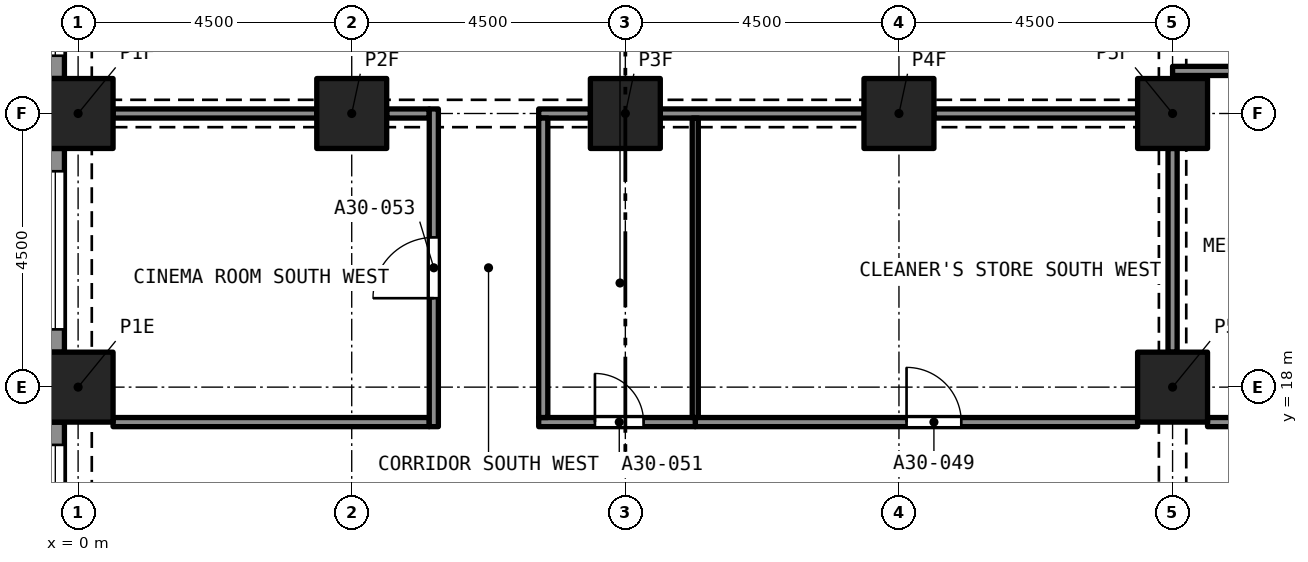
"""IFC4 building model, lengths in metres.
Left out: names, types, materials, properties, quantities, classifications, styles, units other than length and angle.
Written with IfcOpenShell. Run it as: python <this file> out.ifc"""

import sys

from ifc_helpers import new_model, si_unit, direction, frame, frame_2d, origin, origin_2d, place, context, subcontext, project, spatial, rectangle, extrude, element, fill, save


model = new_model("IFC4")
c1 = context("Model", 3, precision=1e-05, world=origin(), true_north=direction((0.0, 1.0)))
c2 = subcontext(c1, "Body", "Model", "MODEL_VIEW")
j1 = project(units=[si_unit("LENGTHUNIT", "METRE"), si_unit("PLANEANGLEUNIT", "RADIAN")], contexts=[c1])
p1 = place(None, origin())
s1 = spatial("IfcSite", under=j1, at=p1, CompositionType="ELEMENT")
p2 = place(p1, origin())
s2 = spatial("IfcBuilding", under=s1, at=p2, CompositionType="ELEMENT")
p3 = place(p2, frame((0.0, 0.0, 108.8)))
s3 = spatial("IfcBuildingStorey", under=s2, at=p3, CompositionType="ELEMENT", Elevation=108.8)
for number, where, z_axis, x_axis in (
    (1, (0.0, 18.0, 0.0), (0.0, 0.0, 1.0), (1.0, 0.0, 0.0)),
    (2, (18.0, 18.0, 0.0), (0.0, 0.0, 1.0), (1.0, 0.0, 0.0)),
    (3, (0.0, 22.5, 0.0), (0.0, 0.0, 1.0), (1.0, 0.0, 0.0)),
    (4, (4.5, 22.5, 0.0), (0.0, 0.0, 1.0), (1.0, 0.0, 0.0)),
    (5, (9.0, 22.5, 0.0), (0.0, 0.0, 1.0), (1.0, 0.0, 0.0)),
    (6, (13.5, 22.5, 0.0), (0.0, 0.0, 1.0), (1.0, 0.0, 0.0)),
    (7, (18.0, 22.5, 0.0), (0.0, 0.0, 1.0), (1.0, 0.0, 0.0)),
):
    element("IfcColumn", number, at=place(p3, frame(where, z_axis=z_axis, x_axis=x_axis)), inside=s3, PredefinedType="COLUMN", context=c2, shape_type="SweptSolid", body=[
        extrude(rectangle(XDim=1.15, YDim=1.15, at=origin_2d()), origin(), (0.0, 0.0, 1.0), 3.2),
    ])
p4 = place(p3, frame((-0.375, 23.075, 0.0), z_axis=(0.0, 0.0, 1.0), x_axis=(0.0, 1.0, 0.0)))
e8 = element("IfcWall", 8, at=p4, inside=s3, PredefinedType="SOLIDWALL", context=c2, shape_type="SweptSolid", body=[
    extrude(rectangle(XDim=3.35, YDim=0.3, at=frame_2d((1.675, 0.0))), origin(), (0.0, 0.0, 1.0), 3.2),
])
p5 = place(p4, frame((0.375, 0.0, 0.45)))
e9 = element("IfcOpeningElement", 9, at=p5, cuts=e8, PredefinedType="OPENING", context=c2, shape_type="SweptSolid", body=[
    extrude(rectangle(XDim=2.6, YDim=1.95, at=frame_2d((1.3, 0.975))), frame((0.0, 0.16, 0.0), z_axis=(0.0, -1.0, 0.0), x_axis=(1.0, 0.0, 0.0)), (0.0, 0.0, 1.0), 0.32),
])
p6 = place(p3, frame((-0.375, 18.575, 0.0), z_axis=(0.0, 0.0, 1.0), x_axis=(0.0, 1.0, 0.0)))
e10 = element("IfcWall", 10, at=p6, inside=s3, PredefinedType="SOLIDWALL", context=c2, shape_type="SweptSolid", body=[
    extrude(rectangle(XDim=3.35, YDim=0.3, at=frame_2d((1.675, 0.0))), origin(), (0.0, 0.0, 1.0), 3.2),
])
p7 = place(p6, frame((0.375, 0.0, 0.45)))
e11 = element("IfcOpeningElement", 11, at=p7, cuts=e10, PredefinedType="OPENING", context=c2, shape_type="SweptSolid", body=[
    extrude(rectangle(XDim=2.6, YDim=1.95, at=frame_2d((1.3, 0.975))), frame((0.0, 0.16, 0.0), z_axis=(0.0, -1.0, 0.0), x_axis=(1.0, 0.0, 0.0)), (0.0, 0.0, 1.0), 0.32),
])
p8 = place(p3, frame((-0.375, 14.075, 0.0), z_axis=(0.0, 0.0, 1.0), x_axis=(0.0, 1.0, 0.0)))
e12 = element("IfcWall", 12, at=p8, inside=s3, PredefinedType="SOLIDWALL", context=c2, shape_type="SweptSolid", body=[
    extrude(rectangle(XDim=3.35, YDim=0.3, at=frame_2d((1.675, 0.0))), origin(), (0.0, 0.0, 1.0), 3.2),
])
p9 = place(p8, frame((0.375, 0.0, 0.45)))
e13 = element("IfcOpeningElement", 13, at=p9, cuts=e12, PredefinedType="OPENING", context=c2, shape_type="SweptSolid", body=[
    extrude(rectangle(XDim=2.6, YDim=1.95, at=frame_2d((1.3, 0.975))), frame((0.0, 0.16, 0.0), z_axis=(0.0, -1.0, 0.0), x_axis=(1.0, 0.0, 0.0)), (0.0, 0.0, 1.0), 0.32),
])
p10 = place(p3, frame((18.575, 17.425, 0.0), z_axis=(0.0, 0.0, 1.0), x_axis=(1.0, 0.0, 0.0)))
e14 = element("IfcWall", 14, at=p10, inside=s3, PredefinedType="PARTITIONING", context=c2, shape_type="SweptSolid", body=[
    extrude(rectangle(XDim=5.2, YDim=0.15, at=frame_2d((2.6, 0.0))), origin(), (0.0, 0.0, 1.0), 2.75),
])
p11 = place(p3, frame((10.15, 17.425, 0.0), z_axis=(0.0, 0.0, 1.0), x_axis=(1.0, 0.0, 0.0)))
e15 = element("IfcWall", 15, at=p11, inside=s3, PredefinedType="PARTITIONING", context=c2, shape_type="SweptSolid", body=[
    extrude(rectangle(XDim=7.275, YDim=0.15, at=frame_2d((3.638, 0.0))), origin(), (0.0, 0.0, 1.0), 2.9),
])
p12 = place(p11, frame((3.475, 0.0, 0.0)))
e16 = element("IfcOpeningElement", 16, at=p12, cuts=e15, PredefinedType="OPENING", context=c2, shape_type="SweptSolid", body=[
    extrude(rectangle(XDim=0.9, YDim=2.1, at=frame_2d((0.45, 1.05))), frame((0.0, 0.085, 0.0), z_axis=(0.0, -1.0, 0.0), x_axis=(1.0, 0.0, 0.0)), (0.0, 0.0, 1.0), 0.17),
])
p13 = place(p3, frame((7.575, 17.425, 0.0), z_axis=(0.0, 0.0, 1.0), x_axis=(1.0, 0.0, 0.0)))
e17 = element("IfcWall", 17, at=p13, inside=s3, PredefinedType="PARTITIONING", context=c2, shape_type="SweptSolid", body=[
    extrude(rectangle(XDim=2.575, YDim=0.15, at=frame_2d((1.288, 0.0))), origin(), (0.0, 0.0, 1.0), 2.9),
])
p14 = place(p13, frame((0.925, 0.0, 0.0)))
e18 = element("IfcOpeningElement", 18, at=p14, cuts=e17, PredefinedType="OPENING", context=c2, shape_type="SweptSolid", body=[
    extrude(rectangle(XDim=0.8, YDim=2.1, at=frame_2d((0.4, 1.05))), frame((0.0, 0.085, 0.0), z_axis=(0.0, -1.0, 0.0), x_axis=(1.0, 0.0, 0.0)), (0.0, 0.0, 1.0), 0.17),
])
p15 = place(p3, frame((0.575, 17.425, 0.0), z_axis=(0.0, 0.0, 1.0), x_axis=(1.0, 0.0, 0.0)))
e19 = element("IfcWall", 19, at=p15, inside=s3, PredefinedType="PARTITIONING", context=c2, shape_type="SweptSolid", body=[
    extrude(rectangle(XDim=5.2, YDim=0.15, at=frame_2d((2.6, 0.0))), origin(), (0.0, 0.0, 1.0), 2.9),
])
p16 = place(p3, frame((18.0, 23.2, 0.0), z_axis=(0.0, 0.0, 1.0), x_axis=(1.0, 0.0, 0.0)))
e20 = element("IfcWall", 20, at=p16, inside=s3, PredefinedType="PARTITIONING", context=c2, shape_type="SweptSolid", body=[
    extrude(rectangle(XDim=5.775, YDim=0.15, at=frame_2d((2.887, 0.0))), origin(), (0.0, 0.0, 1.0), 2.75),
])
for number, where, z_axis, x_axis in (
    (21, (18.0, 18.575, 0.0), (0.0, 0.0, 1.0), (0.0, 1.0, 0.0)),
    (22, (14.075, 22.5, 0.0), (0.0, 0.0, 1.0), (1.0, 0.0, 0.0)),
    (23, (9.575, 22.5, 0.0), (0.0, 0.0, 1.0), (1.0, 0.0, 0.0)),
):
    element("IfcWall", number, at=place(p3, frame(where, z_axis=z_axis, x_axis=x_axis)), inside=s3, PredefinedType="PARTITIONING", context=c2, shape_type="SweptSolid", body=[
        extrude(rectangle(XDim=3.35, YDim=0.15, at=frame_2d((1.675, 0.0))), origin(), (0.0, 0.0, 1.0), 2.38),
    ])
p17 = place(p3, frame((7.575, 22.5, 0.0), z_axis=(0.0, 0.0, 1.0), x_axis=(1.0, 0.0, 0.0)))
e24 = element("IfcWall", 24, at=p17, inside=s3, PredefinedType="PARTITIONING", context=c2, shape_type="SweptSolid", body=[
    extrude(rectangle(XDim=0.85, YDim=0.15, at=frame_2d((0.425, 0.0))), origin(), (0.0, 0.0, 1.0), 2.38),
])
p18 = place(p3, frame((5.075, 22.5, 0.0), z_axis=(0.0, 0.0, 1.0), x_axis=(1.0, 0.0, 0.0)))
e25 = element("IfcWall", 25, at=p18, inside=s3, PredefinedType="PARTITIONING", context=c2, shape_type="SweptSolid", body=[
    extrude(rectangle(XDim=0.7, YDim=0.15, at=frame_2d((0.35, 0.0))), origin(), (0.0, 0.0, 1.0), 2.38),
])
p19 = place(p3, frame((0.575, 22.5, 0.0), z_axis=(0.0, 0.0, 1.0), x_axis=(1.0, 0.0, 0.0)))
e26 = element("IfcWall", 26, at=p19, inside=s3, PredefinedType="PARTITIONING", context=c2, shape_type="SweptSolid", body=[
    extrude(rectangle(XDim=3.35, YDim=0.15, at=frame_2d((1.675, 0.0))), origin(), (0.0, 0.0, 1.0), 2.38),
])
p20 = place(p3, frame((7.65, 17.5, 0.0), z_axis=(0.0, 0.0, 1.0), x_axis=(0.0, 1.0, 0.0)))
e27 = element("IfcWall", 27, at=p20, inside=s3, PredefinedType="PARTITIONING", context=c2, shape_type="SweptSolid", body=[
    extrude(rectangle(XDim=4.925, YDim=0.15, at=frame_2d((2.462, 0.0))), origin(), (0.0, 0.0, 1.0), 2.9),
])
p21 = place(p3, frame((5.85, 17.35, 0.0), z_axis=(0.0, 0.0, 1.0), x_axis=(0.0, 1.0, 0.0)))
e28 = element("IfcWall", 28, at=p21, inside=s3, PredefinedType="PARTITIONING", context=c2, shape_type="SweptSolid", body=[
    extrude(rectangle(XDim=5.225, YDim=0.15, at=frame_2d((2.612, 0.0))), origin(), (0.0, 0.0, 1.0), 2.9),
])
p22 = place(p21, frame((2.113, 0.0, 0.0)))
e29 = element("IfcOpeningElement", 29, at=p22, cuts=e28, PredefinedType="OPENING", context=c2, shape_type="SweptSolid", body=[
    extrude(rectangle(XDim=1.0, YDim=2.1, at=frame_2d((0.5, 1.05))), frame((0.0, 0.085, 0.0), z_axis=(0.0, -1.0, 0.0), x_axis=(1.0, 0.0, 0.0)), (0.0, 0.0, 1.0), 0.17),
])
p23 = place(p3, frame((10.15, 17.5, 0.0), z_axis=(0.0, 0.0, 1.0), x_axis=(0.0, 1.0, 0.0)))
e30 = element("IfcWall", 30, at=p23, inside=s3, PredefinedType="PARTITIONING", context=c2, shape_type="SweptSolid", body=[
    extrude(rectangle(XDim=4.925, YDim=0.1, at=frame_2d((2.462, 0.0))), origin(), (0.0, 0.0, 1.0), 2.9),
])
p24 = place(p5, origin())
e31 = element("IfcWindow", 31, at=p24, inside=s3, PartitioningType="SINGLE_PANEL", PredefinedType="WINDOW", context=c2, shape_type="SweptSolid", body=[
    extrude(rectangle(XDim=2.6, YDim=1.95, at=frame_2d((1.3, 0.975))), frame((0.0, 0.03, 0.0), z_axis=(0.0, -1.0, 0.0), x_axis=(1.0, 0.0, 0.0)), (0.0, 0.0, 1.0), 0.06),
])
fill(e9, e31)
p25 = place(p7, origin())
e32 = element("IfcWindow", 32, at=p25, inside=s3, PartitioningType="SINGLE_PANEL", PredefinedType="WINDOW", context=c2, shape_type="SweptSolid", body=[
    extrude(rectangle(XDim=2.6, YDim=1.95, at=frame_2d((1.3, 0.975))), frame((0.0, 0.03, 0.0), z_axis=(0.0, -1.0, 0.0), x_axis=(1.0, 0.0, 0.0)), (0.0, 0.0, 1.0), 0.06),
])
fill(e11, e32)
p26 = place(p9, origin())
e33 = element("IfcWindow", 33, at=p26, inside=s3, PartitioningType="SINGLE_PANEL", PredefinedType="WINDOW", context=c2, shape_type="SweptSolid", body=[
    extrude(rectangle(XDim=2.6, YDim=1.95, at=frame_2d((1.3, 0.975))), frame((0.0, 0.03, 0.0), z_axis=(0.0, -1.0, 0.0), x_axis=(1.0, 0.0, 0.0)), (0.0, 0.0, 1.0), 0.06),
])
fill(e13, e33)
p27 = place(p12, origin())
e34 = element("IfcDoor", 34, at=p27, inside=s3, OperationType="SINGLE_SWING_RIGHT", PredefinedType="DOOR", context=c2, shape_type="SweptSolid", body=[
    extrude(rectangle(XDim=0.9, YDim=2.1, at=frame_2d((0.45, 1.05))), frame((0.0, 0.025, 0.0), z_axis=(0.0, -1.0, 0.0), x_axis=(1.0, 0.0, 0.0)), (0.0, 0.0, 1.0), 0.05),
])
fill(e16, e34)
p28 = place(p14, origin())
e35 = element("IfcDoor", 35, at=p28, inside=s3, OperationType="SINGLE_SWING_RIGHT", PredefinedType="DOOR", context=c2, shape_type="SweptSolid", body=[
    extrude(rectangle(XDim=0.8, YDim=2.1, at=frame_2d((0.4, 1.05))), frame((0.0, 0.025, 0.0), z_axis=(0.0, -1.0, 0.0), x_axis=(1.0, 0.0, 0.0)), (0.0, 0.0, 1.0), 0.05),
])
fill(e18, e35)
p29 = place(p22, origin())
e36 = element("IfcDoor", 36, at=p29, inside=s3, OperationType="SINGLE_SWING_LEFT", PredefinedType="DOOR", context=c2, shape_type="SweptSolid", body=[
    extrude(rectangle(XDim=1.0, YDim=2.1, at=frame_2d((0.5, 1.05))), frame((0.0, 0.025, 0.0), z_axis=(0.0, -1.0, 0.0), x_axis=(1.0, 0.0, 0.0)), (0.0, 0.0, 1.0), 0.05),
])
fill(e29, e36)
save(model, sys.argv[1])
